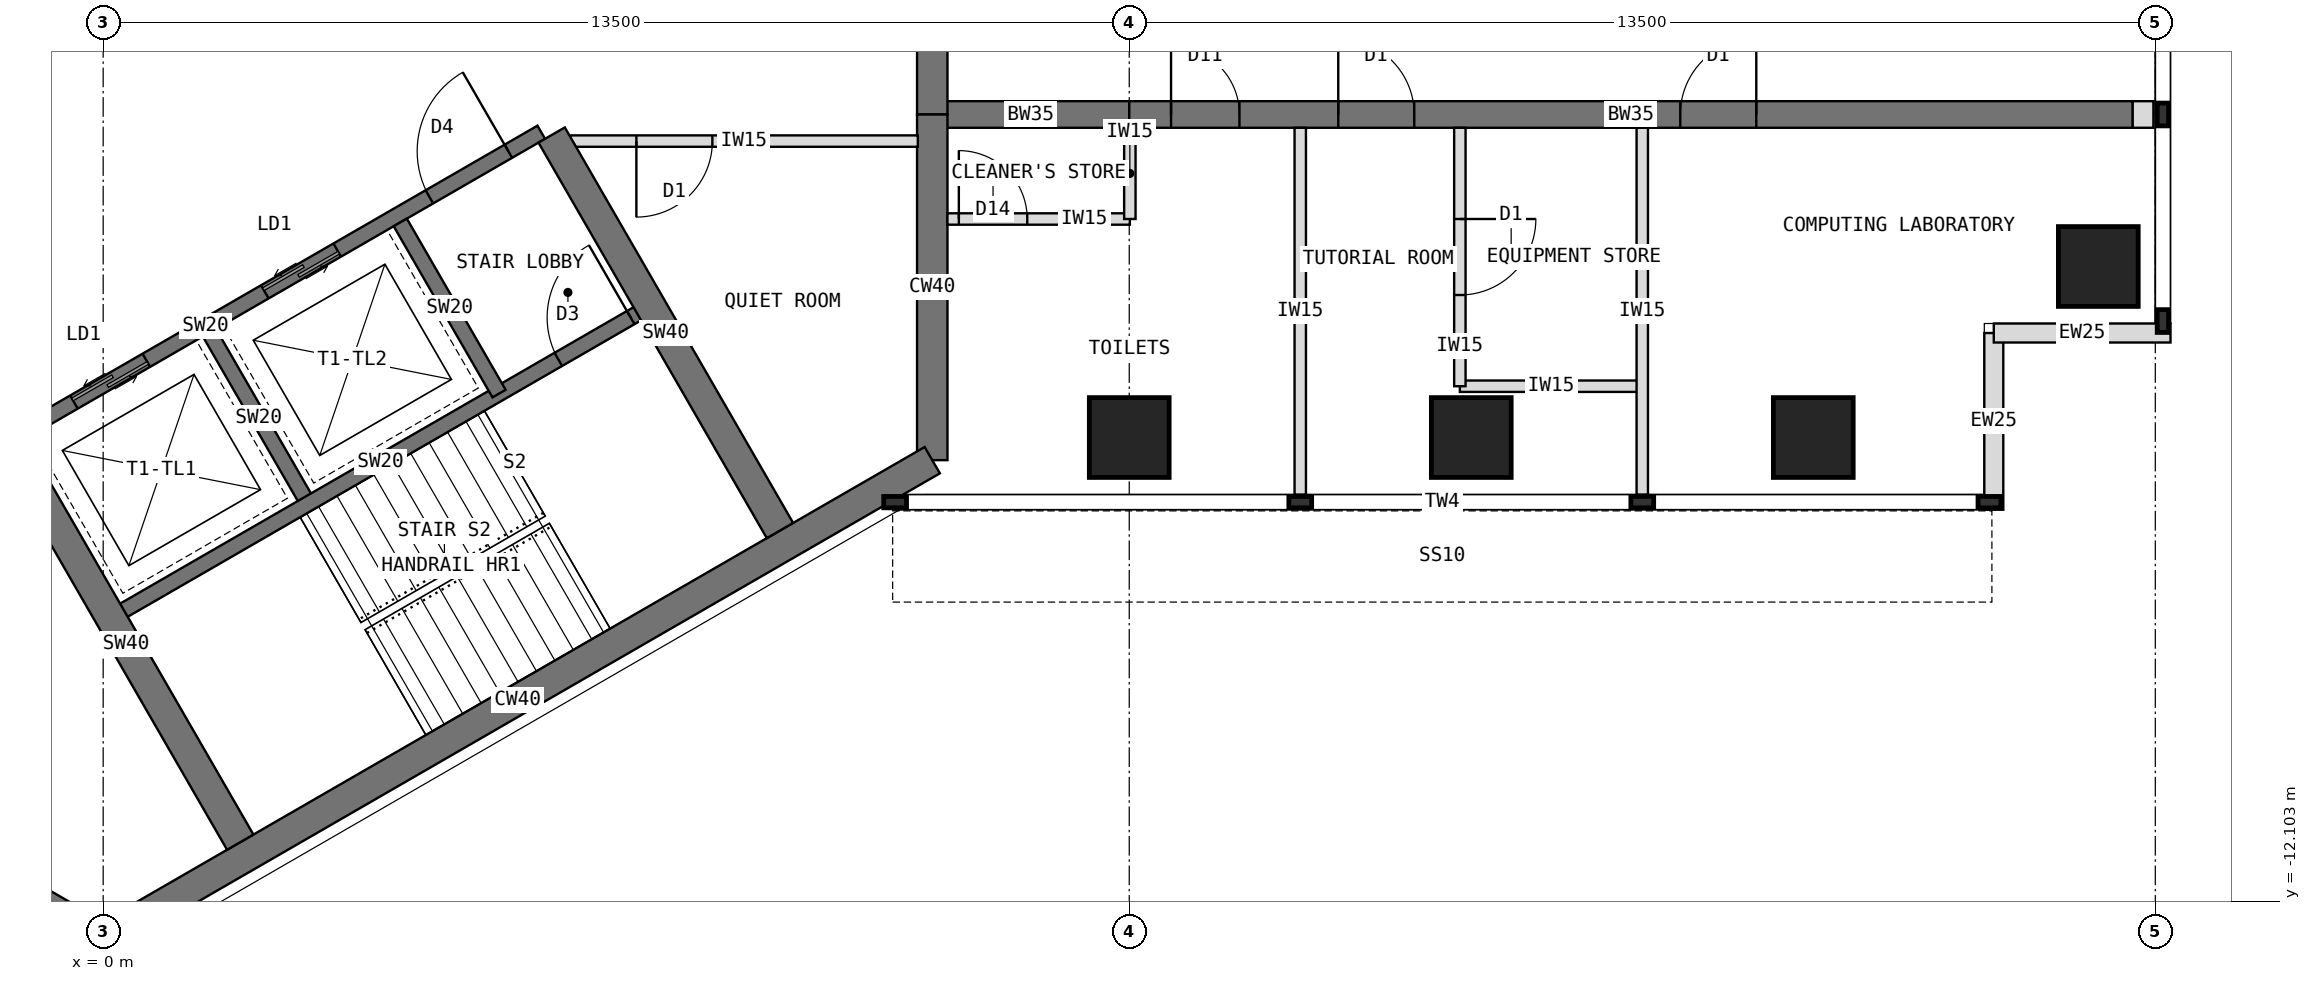
"""IFC4 building model, lengths in metres.
Left out: names, types, materials, properties, quantities, classifications, styles, units other than length and angle.
Written with IfcOpenShell. Run it as: python <this file> out.ifc"""

import sys

from ifc_helpers import new_model, si_unit, direction, frame, frame_2d, origin, origin_2d, place, context, subcontext, project, spatial, rectangle, extrude, element, fill, save


model = new_model("IFC4")
c1 = context("Model", 3, precision=1e-05, world=origin(), true_north=direction((0.0, 1.0)))
c2 = subcontext(c1, "Body", "Model", "MODEL_VIEW")
j1 = project(units=[si_unit("LENGTHUNIT", "METRE"), si_unit("PLANEANGLEUNIT", "RADIAN")], contexts=[c1])
p1 = place(None, origin())
s1 = spatial("IfcSite", under=j1, at=p1, CompositionType="ELEMENT")
p2 = place(p1, origin())
s2 = spatial("IfcBuilding", under=s1, at=p2, CompositionType="ELEMENT")
p3 = place(p2, frame((0.0, 0.0, 259.5)))
s3 = spatial("IfcBuildingStorey", under=s2, at=p3, CompositionType="ELEMENT", Elevation=259.5)
p4 = place(p3, frame((10.908, -6.298, 0.0), z_axis=(0.0, 0.0, 1.0), x_axis=(0.0, 1.0, 0.0)))
e1 = element("IfcWall", 1, at=p4, inside=s3, PredefinedType="SHEAR", context=c2, shape_type="SweptSolid", body=[
    extrude(rectangle(XDim=4.548, YDim=0.4, at=frame_2d((2.274, 0.0))), origin(), (0.0, 0.0, 1.0), 4.0),
])
p5 = place(p3, frame((10.908, -1.75, 0.0), z_axis=(0.0, 0.0, 1.0), x_axis=(0.0, 1.0, 0.0)))
e2 = element("IfcWall", 2, at=p5, inside=s3, PredefinedType="SHEAR", context=c2, shape_type="SweptSolid", body=[
    extrude(rectangle(XDim=3.5, YDim=0.4, at=frame_2d((1.75, 0.0))), origin(), (0.0, 0.0, 1.0), 4.0),
])
p6 = place(p5, frame((0.85, 0.0, 0.0)))
e3 = element("IfcOpeningElement", 3, at=p6, cuts=e2, PredefinedType="OPENING", context=c2, shape_type="SweptSolid", body=[
    extrude(rectangle(XDim=1.8, YDim=2.1, at=frame_2d((0.9, 1.05))), frame((0.0, 0.21, 0.0), z_axis=(0.0, -1.0, 0.0), x_axis=(1.0, 0.0, 0.0)), (0.0, 0.0, 1.0), 0.42),
])
p7 = place(p3, frame((-3.939, -10.322, 0.0), z_axis=(0.0, 0.0, 1.0), x_axis=(0.866011268655, -0.500024481964, 0.0)))
e4 = element("IfcWall", 4, at=p7, inside=s3, PredefinedType="SHEAR", context=c2, shape_type="SweptSolid", body=[
    extrude(rectangle(XDim=4.548, YDim=0.4, at=frame_2d((2.274, 0.0))), origin(), (0.0, 0.0, 1.0), 4.0),
])
p8 = place(p3, frame((0.0, -12.596, 0.0), z_axis=(0.0, 0.0, 1.0), x_axis=(0.866021940709, 0.500005998175, 0.0)))
e5 = element("IfcWall", 5, at=p8, inside=s3, PredefinedType="SHEAR", context=c2, shape_type="SweptSolid", body=[
    extrude(rectangle(XDim=12.596, YDim=0.4, at=frame_2d((6.298, 0.0))), origin(), (0.0, 0.0, 1.0), 4.0),
])
p9 = place(p3, frame((10.908, -1.75, 0.0), z_axis=(0.0, 0.0, 1.0), x_axis=(1.0, 0.0, 0.0)))
e6 = element("IfcWall", 6, at=p9, inside=s3, PredefinedType="SHEAR", context=c2, shape_type="SweptSolid", body=[
    extrude(rectangle(XDim=2.592, YDim=0.35, at=frame_2d((1.296, 0.0))), origin(), (0.0, 0.0, 1.0), 4.0),
])
p10 = place(p3, frame((13.5, -1.75, 0.0), z_axis=(0.0, 0.0, 1.0), x_axis=(1.0, 0.0, 0.0)))
e7 = element("IfcWall", 7, at=p10, inside=s3, PredefinedType="SHEAR", context=c2, shape_type="SweptSolid", body=[
    extrude(rectangle(XDim=13.2, YDim=0.35, at=frame_2d((6.6, 0.0))), origin(), (0.0, 0.0, 1.0), 4.0),
])
p11 = place(p10, frame((0.55, 0.0, 0.0)))
e8 = element("IfcOpeningElement", 8, at=p11, cuts=e7, PredefinedType="OPENING", context=c2, shape_type="SweptSolid", body=[
    extrude(rectangle(XDim=0.9, YDim=2.1, at=frame_2d((0.45, 1.05))), frame((0.0, 0.185, 0.0), z_axis=(0.0, -1.0, 0.0), x_axis=(1.0, 0.0, 0.0)), (0.0, 0.0, 1.0), 0.37),
])
p12 = place(p10, frame((2.75, 0.0, 0.0)))
e9 = element("IfcOpeningElement", 9, at=p12, cuts=e7, PredefinedType="OPENING", context=c2, shape_type="SweptSolid", body=[
    extrude(rectangle(XDim=1.0, YDim=2.1, at=frame_2d((0.5, 1.05))), frame((0.0, 0.185, 0.0), z_axis=(0.0, -1.0, 0.0), x_axis=(1.0, 0.0, 0.0)), (0.0, 0.0, 1.0), 0.37),
])
p13 = place(p10, frame((7.25, 0.0, 0.0)))
e10 = element("IfcOpeningElement", 10, at=p13, cuts=e7, PredefinedType="OPENING", context=c2, shape_type="SweptSolid", body=[
    extrude(rectangle(XDim=1.0, YDim=2.1, at=frame_2d((0.5, 1.05))), frame((0.0, 0.185, 0.0), z_axis=(0.0, -1.0, 0.0), x_axis=(1.0, 0.0, 0.0)), (0.0, 0.0, 1.0), 0.37),
])
for number, where, z_axis, x_axis in (
    (11, (13.5, -6.0, 0.0), (0.0, 0.0, 1.0), (1.0, 0.0, 0.0)),
    (12, (18.0, -6.0, 0.0), (0.0, 0.0, 1.0), (1.0, 0.0, 0.0)),
    (13, (22.5, -6.0, 0.0), (0.0, 0.0, 1.0), (1.0, 0.0, 0.0)),
    (14, (26.25, -3.75, 0.0), (0.0, 0.0, 1.0), (1.0, 0.0, 0.0)),
):
    element("IfcColumn", number, at=place(p3, frame(where, z_axis=z_axis, x_axis=x_axis)), inside=s3, PredefinedType="COLUMN", context=c2, shape_type="SweptSolid", body=[
        extrude(rectangle(XDim=1.05, YDim=1.05, at=origin_2d()), origin(), (0.0, 0.0, 1.0), 4.0),
    ])
for number, where, z_axis, x_axis in (
    (15, (24.875, -6.95, 0.0), (0.0, 0.0, 1.0), (0.0, 1.0, 0.0)),
    (16, (24.875, -4.625, 0.0), (0.0, 0.0, 1.0), (1.0, 0.0, 0.0)),
):
    element("IfcWall", number, at=place(p3, frame(where, z_axis=z_axis, x_axis=x_axis)), inside=s3, PredefinedType="STANDARD", context=c2, shape_type="SweptSolid", body=[
        extrude(rectangle(XDim=2.325, YDim=0.25, at=frame_2d((1.163, 0.0))), origin(), (0.0, 0.0, 1.0), 3.8),
    ])
p14 = place(p3, frame((26.7, -1.75, 0.0), z_axis=(0.0, 0.0, 1.0), x_axis=(1.0, 0.0, 0.0)))
e17 = element("IfcWall", 17, at=p14, inside=s3, PredefinedType="PARTITIONING", context=c2, shape_type="SweptSolid", body=[
    extrude(rectangle(XDim=0.275, YDim=0.35, at=frame_2d((0.138, 0.0))), origin(), (0.0, 0.0, 1.0), 3.8),
])
p15 = place(p3, frame((-1.164, -5.984, 0.0), z_axis=(0.0, 0.0, 1.0), x_axis=(0.866026010844, 0.49999894854, 0.0)))
e18 = element("IfcWall", 18, at=p15, inside=s3, PredefinedType="SHEAR", context=c2, shape_type="SweptSolid", body=[
    extrude(rectangle(XDim=8.0, YDim=0.2, at=frame_2d((4.0, 0.0))), origin(), (0.0, 0.0, 1.0), 4.0),
])
p16 = place(p15, frame((6.3, 0.0, 0.0)))
e19 = element("IfcOpeningElement", 19, at=p16, cuts=e18, PredefinedType="OPENING", context=c2, shape_type="SweptSolid", body=[
    extrude(rectangle(XDim=1.2, YDim=2.1, at=frame_2d((0.6, 1.05))), frame((0.0, 0.11, 0.0), z_axis=(0.0, -1.0, 0.0), x_axis=(1.0, 0.0, 0.0)), (0.0, 0.0, 1.0), 0.22),
])
p17 = place(p15, frame((0.9, 0.0, 0.0)))
e20 = element("IfcOpeningElement", 20, at=p17, cuts=e18, PredefinedType="OPENING", context=c2, shape_type="SweptSolid", body=[
    extrude(rectangle(XDim=1.1, YDim=2.2, at=frame_2d((0.55, 1.1))), frame((0.0, 0.11, 0.0), z_axis=(0.0, -1.0, 0.0), x_axis=(1.0, 0.0, 0.0)), (0.0, 0.0, 1.0), 0.22),
])
p18 = place(p15, frame((3.8, 0.0, 0.0)))
e21 = element("IfcOpeningElement", 21, at=p18, cuts=e18, PredefinedType="OPENING", context=c2, shape_type="SweptSolid", body=[
    extrude(rectangle(XDim=1.1, YDim=2.2, at=frame_2d((0.55, 1.1))), frame((0.0, 0.11, 0.0), z_axis=(0.0, -1.0, 0.0), x_axis=(1.0, 0.0, 0.0)), (0.0, 0.0, 1.0), 0.22),
])
p19 = place(p3, frame((1.397, -4.62, 0.0), z_axis=(0.0, 0.0, 1.0), x_axis=(0.499936506574, -0.866062058628, 0.0)))
e22 = element("IfcWall", 22, at=p19, inside=s3, PredefinedType="SHEAR", context=c2, shape_type="SweptSolid", body=[
    extrude(rectangle(XDim=2.6, YDim=0.2, at=frame_2d((1.3, 0.0))), origin(), (0.0, 0.0, 1.0), 4.0),
])
p20 = place(p3, frame((3.909, -3.17, 0.0), z_axis=(0.0, 0.0, 1.0), x_axis=(0.49997716683, -0.86603858612, 0.0)))
e23 = element("IfcWall", 23, at=p20, inside=s3, PredefinedType="SHEAR", context=c2, shape_type="SweptSolid", body=[
    extrude(rectangle(XDim=2.6, YDim=0.2, at=frame_2d((1.3, 0.0))), origin(), (0.0, 0.0, 1.0), 4.0),
])
p21 = place(p3, frame((0.186, -8.322, 0.0), z_axis=(0.0, 0.0, 1.0), x_axis=(0.866026010844, 0.49999894854, 0.0)))
e24 = element("IfcWall", 24, at=p21, inside=s3, PredefinedType="SHEAR", context=c2, shape_type="SweptSolid", body=[
    extrude(rectangle(XDim=8.0, YDim=0.2, at=frame_2d((4.0, 0.0))), origin(), (0.0, 0.0, 1.0), 4.0),
])
p22 = place(p21, frame((6.7, 0.0, 0.0)))
e25 = element("IfcOpeningElement", 25, at=p22, cuts=e24, PredefinedType="OPENING", context=c2, shape_type="SweptSolid", body=[
    extrude(rectangle(XDim=1.1, YDim=2.1, at=frame_2d((0.55, 1.05))), frame((0.0, 0.11, 0.0), z_axis=(0.0, -1.0, 0.0), x_axis=(1.0, 0.0, 0.0)), (0.0, 0.0, 1.0), 0.22),
])
for number, where, z_axis, x_axis in (
    (26, (5.901, -2.02, 0.0), (0.0, 0.0, 1.0), (0.5, -0.866, 0.0)),
    (27, (-1.201, -6.12, 0.0), (0.0, 0.0, 1.0), (0.5, -0.866, 0.0)),
):
    element("IfcWall", number, at=place(p3, frame(where, z_axis=z_axis, x_axis=x_axis)), inside=s3, PredefinedType="SHEAR", context=c2, shape_type="SweptSolid", body=[
        extrude(rectangle(XDim=6.008, YDim=0.4, at=frame_2d((3.004, 0.0))), origin(), (0.0, 0.0, 1.0), 4.0),
    ])
for number, where, z_axis, x_axis in (
    (28, (15.75, -1.925, 0.0), (0.0, 0.0, 1.0), (0.0, -1.0, 0.0)),
    (29, (20.25, -1.925, 0.0), (0.0, 0.0, 1.0), (0.0, -1.0, 0.0)),
):
    element("IfcWall", number, at=place(p3, frame(where, z_axis=z_axis, x_axis=x_axis)), inside=s3, PredefinedType="PARTITIONING", context=c2, shape_type="SweptSolid", body=[
        extrude(rectangle(XDim=4.825, YDim=0.15, at=frame_2d((2.413, 0.0))), origin(), (0.0, 0.0, 1.0), 3.8),
    ])
p23 = place(p3, frame((17.85, -5.325, 0.0), z_axis=(0.0, 0.0, 1.0), x_axis=(1.0, 0.0, 0.0)))
e30 = element("IfcWall", 30, at=p23, inside=s3, PredefinedType="PARTITIONING", context=c2, shape_type="SweptSolid", body=[
    extrude(rectangle(XDim=2.4, YDim=0.15, at=frame_2d((1.2, 0.0))), origin(), (0.0, 0.0, 1.0), 3.8),
])
p24 = place(p3, frame((17.85, -1.925, 0.0), z_axis=(0.0, 0.0, 1.0), x_axis=(0.0, -1.0, 0.0)))
e31 = element("IfcWall", 31, at=p24, inside=s3, PredefinedType="PARTITIONING", context=c2, shape_type="SweptSolid", body=[
    extrude(rectangle(XDim=3.4, YDim=0.15, at=frame_2d((1.7, 0.0))), origin(), (0.0, 0.0, 1.0), 3.8),
])
p25 = place(p24, frame((1.2, 0.0, 0.0)))
e32 = element("IfcOpeningElement", 32, at=p25, cuts=e31, PredefinedType="OPENING", context=c2, shape_type="SweptSolid", body=[
    extrude(rectangle(XDim=1.0, YDim=2.1, at=frame_2d((0.5, 1.05))), frame((0.0, 0.085, 0.0), z_axis=(0.0, -1.0, 0.0), x_axis=(1.0, 0.0, 0.0)), (0.0, 0.0, 1.0), 0.17),
])
p26 = place(p3, frame((11.108, -3.125, 0.0), z_axis=(0.0, 0.0, 1.0), x_axis=(1.0, 0.0, 0.0)))
e33 = element("IfcWall", 33, at=p26, inside=s3, PredefinedType="PARTITIONING", context=c2, shape_type="SweptSolid", body=[
    extrude(rectangle(XDim=2.4, YDim=0.15, at=frame_2d((1.2, 0.0))), origin(), (0.0, 0.0, 1.0), 3.8),
])
p27 = place(p26, frame((0.15, 0.0, 0.0)))
e34 = element("IfcOpeningElement", 34, at=p27, cuts=e33, PredefinedType="OPENING", context=c2, shape_type="SweptSolid", body=[
    extrude(rectangle(XDim=0.9, YDim=2.1, at=frame_2d((0.45, 1.05))), frame((0.0, 0.085, 0.0), z_axis=(0.0, -1.0, 0.0), x_axis=(1.0, 0.0, 0.0)), (0.0, 0.0, 1.0), 0.17),
])
p28 = place(p3, frame((13.508, -1.925, 0.0), z_axis=(0.0, 0.0, 1.0), x_axis=(0.0, -1.0, 0.0)))
e35 = element("IfcWall", 35, at=p28, inside=s3, PredefinedType="PARTITIONING", context=c2, shape_type="SweptSolid", body=[
    extrude(rectangle(XDim=1.2, YDim=0.15, at=frame_2d((0.6, 0.0))), origin(), (0.0, 0.0, 1.0), 3.267),
])
p29 = place(p3, frame((10.718, -2.1, 0.0), z_axis=(0.0, 0.0, 1.0), x_axis=(-1.0, 0.0, 0.0)))
e36 = element("IfcWall", 36, at=p29, inside=s3, PredefinedType="PARTITIONING", context=c2, shape_type="SweptSolid", body=[
    extrude(rectangle(XDim=4.576, YDim=0.15, at=frame_2d((2.288, 0.0))), origin(), (0.0, 0.0, 1.0), 3.8),
])
p30 = place(p29, frame((2.703, 0.0, 0.0)))
e37 = element("IfcOpeningElement", 37, at=p30, cuts=e36, PredefinedType="OPENING", context=c2, shape_type="SweptSolid", body=[
    extrude(rectangle(XDim=1.0, YDim=2.1, at=frame_2d((0.5, 1.05))), frame((0.0, 0.085, 0.0), z_axis=(0.0, -1.0, 0.0), x_axis=(1.0, 0.0, 0.0)), (0.0, 0.0, 1.0), 0.17),
])
p31 = place(p16, origin())
e38 = element("IfcDoor", 38, at=p31, inside=s3, OperationType="SINGLE_SWING_RIGHT", PredefinedType="DOOR", context=c2, shape_type="SweptSolid", body=[
    extrude(rectangle(XDim=1.2, YDim=2.1, at=frame_2d((0.6, 1.05))), frame((0.0, 0.025, 0.0), z_axis=(0.0, -1.0, 0.0), x_axis=(1.0, 0.0, 0.0)), (0.0, 0.0, 1.0), 0.05),
])
fill(e19, e38)
p32 = place(p17, origin())
e39 = element("IfcDoor", 39, at=p32, inside=s3, OperationType="DOUBLE_DOOR_SLIDING", PredefinedType="DOOR", context=c2, shape_type="SweptSolid", body=[
    extrude(rectangle(XDim=1.1, YDim=2.2, at=frame_2d((0.55, 1.1))), frame((0.0, 0.025, 0.0), z_axis=(0.0, -1.0, 0.0), x_axis=(1.0, 0.0, 0.0)), (0.0, 0.0, 1.0), 0.05),
])
fill(e20, e39)
p33 = place(p18, origin())
e40 = element("IfcDoor", 40, at=p33, inside=s3, OperationType="DOUBLE_DOOR_SLIDING", PredefinedType="DOOR", context=c2, shape_type="SweptSolid", body=[
    extrude(rectangle(XDim=1.1, YDim=2.2, at=frame_2d((0.55, 1.1))), frame((0.0, 0.025, 0.0), z_axis=(0.0, -1.0, 0.0), x_axis=(1.0, 0.0, 0.0)), (0.0, 0.0, 1.0), 0.05),
])
fill(e21, e40)
p34 = place(p22, origin())
e41 = element("IfcDoor", 41, at=p34, inside=s3, OperationType="SINGLE_SWING_RIGHT", PredefinedType="DOOR", context=c2, shape_type="SweptSolid", body=[
    extrude(rectangle(XDim=1.1, YDim=2.1, at=frame_2d((0.55, 1.05))), frame((0.0, 0.025, 0.0), z_axis=(0.0, -1.0, 0.0), x_axis=(1.0, 0.0, 0.0)), (0.0, 0.0, 1.0), 0.05),
])
fill(e25, e41)
p35 = place(p25, origin())
e42 = element("IfcDoor", 42, at=p35, inside=s3, OperationType="SINGLE_SWING_LEFT", PredefinedType="DOOR", context=c2, shape_type="SweptSolid", body=[
    extrude(rectangle(XDim=1.0, YDim=2.1, at=frame_2d((0.5, 1.05))), frame((0.0, 0.025, 0.0), z_axis=(0.0, -1.0, 0.0), x_axis=(1.0, 0.0, 0.0)), (0.0, 0.0, 1.0), 0.05),
])
fill(e32, e42)
p36 = place(p27, origin())
e43 = element("IfcDoor", 43, at=p36, inside=s3, OperationType="SINGLE_SWING_LEFT", PredefinedType="DOOR", context=c2, shape_type="SweptSolid", body=[
    extrude(rectangle(XDim=0.9, YDim=2.1, at=frame_2d((0.45, 1.05))), frame((0.0, 0.025, 0.0), z_axis=(0.0, -1.0, 0.0), x_axis=(1.0, 0.0, 0.0)), (0.0, 0.0, 1.0), 0.05),
])
fill(e34, e43)
p37 = place(p30, origin())
e44 = element("IfcDoor", 44, at=p37, inside=s3, OperationType="SINGLE_SWING_RIGHT", PredefinedType="DOOR", context=c2, shape_type="SweptSolid", body=[
    extrude(rectangle(XDim=1.0, YDim=2.1, at=frame_2d((0.5, 1.05))), frame((0.0, 0.025, 0.0), z_axis=(0.0, -1.0, 0.0), x_axis=(1.0, 0.0, 0.0)), (0.0, 0.0, 1.0), 0.05),
])
fill(e37, e44)
p38 = place(p11, origin())
e45 = element("IfcDoor", 45, at=p38, inside=s3, OperationType="SINGLE_SWING_LEFT", PredefinedType="DOOR", context=c2, shape_type="SweptSolid", body=[
    extrude(rectangle(XDim=0.9, YDim=2.1, at=frame_2d((0.45, 1.05))), frame((0.0, 0.025, 0.0), z_axis=(0.0, -1.0, 0.0), x_axis=(1.0, 0.0, 0.0)), (0.0, 0.0, 1.0), 0.05),
])
fill(e8, e45)
p39 = place(p12, origin())
e46 = element("IfcDoor", 46, at=p39, inside=s3, OperationType="SINGLE_SWING_LEFT", PredefinedType="DOOR", context=c2, shape_type="SweptSolid", body=[
    extrude(rectangle(XDim=1.0, YDim=2.1, at=frame_2d((0.5, 1.05))), frame((0.0, 0.025, 0.0), z_axis=(0.0, -1.0, 0.0), x_axis=(1.0, 0.0, 0.0)), (0.0, 0.0, 1.0), 0.05),
])
fill(e9, e46)
p40 = place(p13, origin())
e47 = element("IfcDoor", 47, at=p40, inside=s3, OperationType="SINGLE_SWING_RIGHT", PredefinedType="DOOR", context=c2, shape_type="SweptSolid", body=[
    extrude(rectangle(XDim=1.0, YDim=2.1, at=frame_2d((0.5, 1.05))), frame((0.0, 0.025, 0.0), z_axis=(0.0, -1.0, 0.0), x_axis=(1.0, 0.0, 0.0)), (0.0, 0.0, 1.0), 0.05),
])
fill(e10, e47)
save(model, sys.argv[1])
